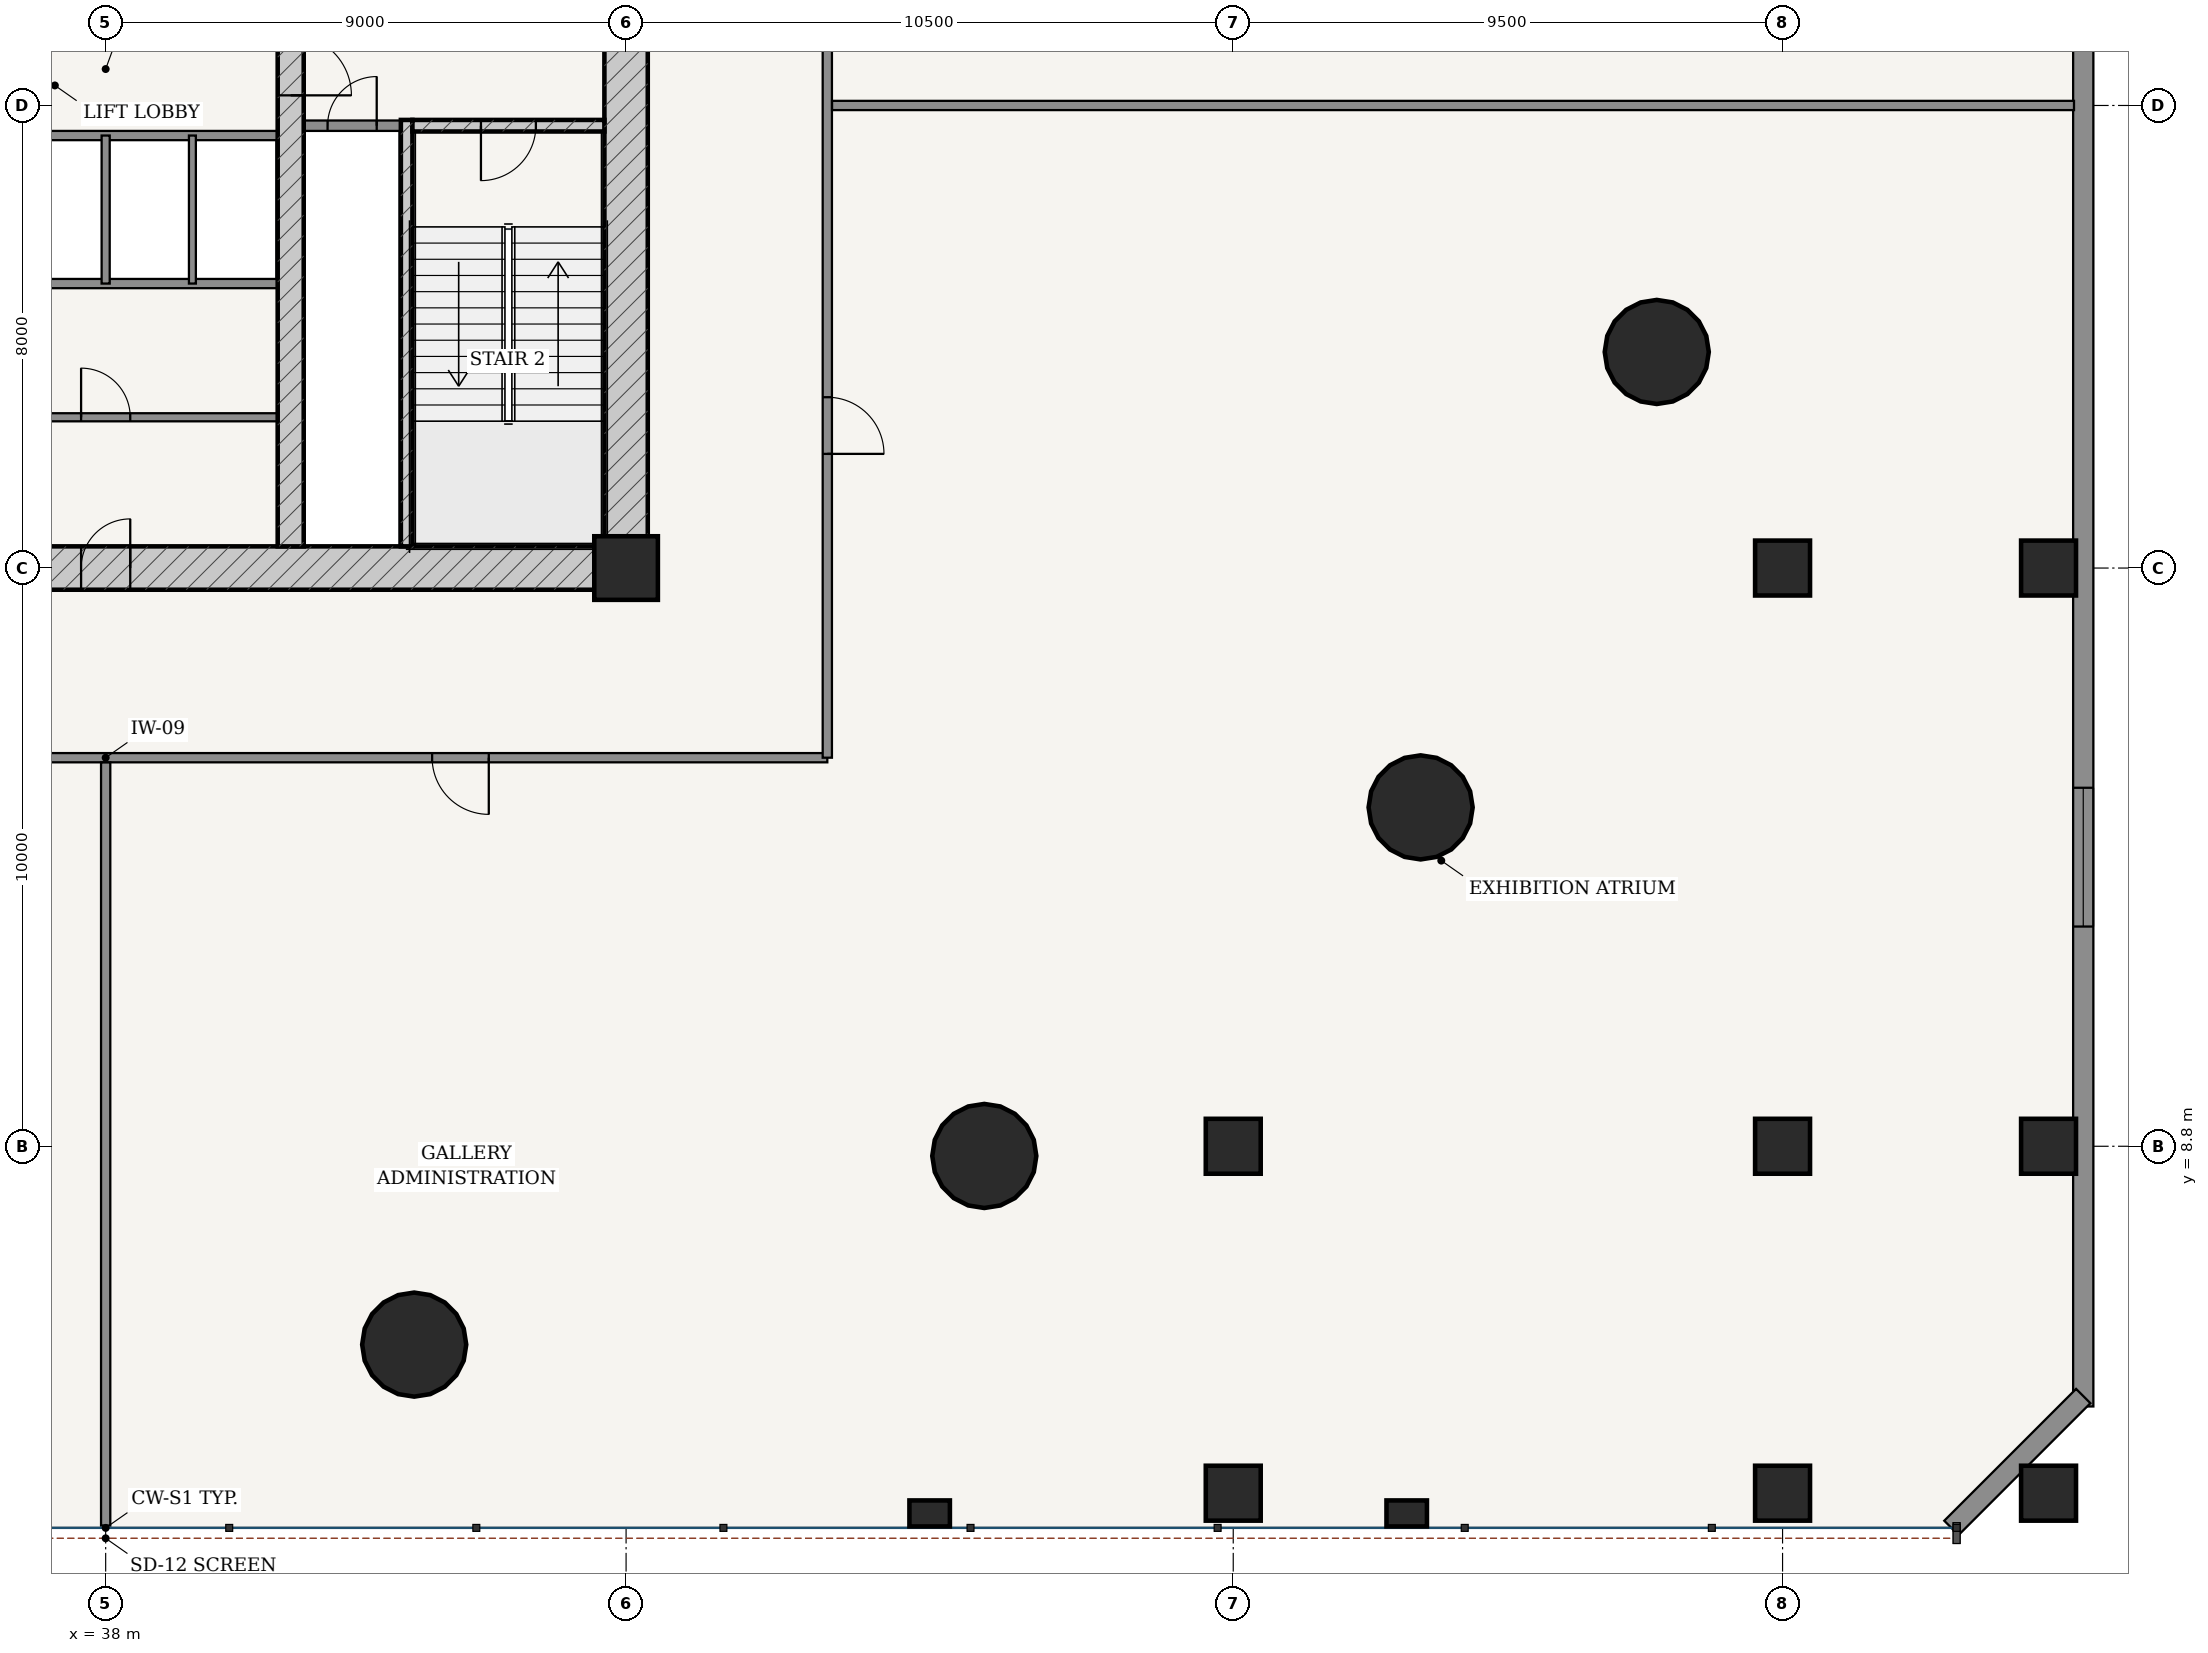
"""IFC4 building model, lengths in metres.
Left out: names, types, materials, properties, quantities, classifications, styles, units other than length and angle.
Written with IfcOpenShell. Run it as: python <this file> out.ifc"""

import sys

from ifc_helpers import new_model, si_unit, direction, frame, frame_2d, origin, origin_2d, place, context, subcontext, project, spatial, rectangle, hollow_circle, extrude, source, transform, mapped, element, fill, save


model = new_model("IFC4")
c1 = context("Model", 3, precision=1e-05, world=origin(), true_north=direction((-0.2419218956, 0.970295726276)))
c2 = subcontext(c1, "Body", "Model", "MODEL_VIEW")
j1 = project(units=[si_unit("LENGTHUNIT", "METRE"), si_unit("PLANEANGLEUNIT", "RADIAN")], contexts=[c1])
p1 = place(None, origin())
s1 = spatial("IfcSite", under=j1, at=p1, CompositionType="ELEMENT")
p2 = place(p1, origin())
s2 = spatial("IfcBuilding", under=s1, at=p2, CompositionType="ELEMENT")
p3 = place(p2, frame((0.0, 0.0, 5.4)))
s3 = spatial("IfcBuildingStorey", under=s2, at=p3, CompositionType="ELEMENT", Elevation=5.4)
p4 = place(p3, frame((47.0, 18.8, 0.0), z_axis=(0.0, 0.0, 1.0), x_axis=(1.0, 0.0, 0.0)))
e1 = element("IfcColumn", 1, at=p4, inside=s3, PredefinedType="COLUMN", context=c2, shape_type="SweptSolid", body=[
    extrude(rectangle(XDim=1.1, YDim=1.1, at=origin_2d()), origin(), (0.0, 0.0, 1.0), 4.5),
])
p5 = place(p3, frame((28.625, 18.8, 0.0), z_axis=(0.0, 0.0, 1.0), x_axis=(1.0, 0.0, 0.0)))
e2 = element("IfcWall", 2, at=p5, inside=s3, PredefinedType="SHEAR", context=c2, shape_type="SweptSolid", body=[
    extrude(rectangle(XDim=18.75, YDim=0.75, at=frame_2d((9.375, 0.0))), origin(), (0.0, 0.0, 1.0), 4.2),
])
p6 = place(p5, frame((8.95, 0.0, 0.0)))
e3 = element("IfcOpeningElement", 3, at=p6, cuts=e2, PredefinedType="OPENING", context=c2, shape_type="SweptSolid", body=[
    extrude(rectangle(XDim=0.85, YDim=2.1, at=frame_2d((0.425, 1.05))), frame((0.0, 0.385, 0.0), z_axis=(0.0, -1.0, 0.0), x_axis=(1.0, 0.0, 0.0)), (0.0, 0.0, 1.0), 0.77),
])
p7 = place(p3, frame((47.0, 19.175, 0.0), z_axis=(0.0, 0.0, 1.0), x_axis=(0.0, 1.0, 0.0)))
e4 = element("IfcWall", 4, at=p7, inside=s3, PredefinedType="SHEAR", context=c2, shape_type="SweptSolid", body=[
    extrude(rectangle(XDim=15.25, YDim=0.75, at=frame_2d((7.625, 0.0))), origin(), (0.0, 0.0, 1.0), 4.2),
])
p8 = place(p7, frame((9.875, 0.0, 0.0)))
e5 = element("IfcOpeningElement", 5, at=p8, cuts=e4, PredefinedType="OPENING", context=c2, shape_type="SweptSolid", body=[
    extrude(rectangle(XDim=1.5, YDim=2.2, at=frame_2d((0.75, 1.1))), frame((0.0, 0.385, 0.0), z_axis=(0.0, -1.0, 0.0), x_axis=(1.0, 0.0, 0.0)), (0.0, 0.0, 1.0), 0.77),
])
p9 = place(p3, frame((43.205, 19.175, 0.0), z_axis=(0.0, 0.0, 1.0), x_axis=(0.0, 1.0, 0.0)))
e6 = element("IfcWall", 6, at=p9, inside=s3, PredefinedType="SOLIDWALL", context=c2, shape_type="SweptSolid", body=[
    extrude(rectangle(XDim=7.375, YDim=0.2, at=frame_2d((3.688, 0.0))), origin(), (0.0, 0.0, 1.0), 4.2),
])
p10 = place(p3, frame((43.305, 26.45, 0.0), z_axis=(0.0, 0.0, 1.0), x_axis=(1.0, 0.0, 0.0)))
e7 = element("IfcWall", 7, at=p10, inside=s3, PredefinedType="SOLIDWALL", context=c2, shape_type="SweptSolid", body=[
    extrude(rectangle(XDim=3.32, YDim=0.2, at=frame_2d((1.66, 0.0))), origin(), (0.0, 0.0, 1.0), 4.2),
])
p11 = place(p10, frame((1.185, 0.0, 0.0)))
e8 = element("IfcOpeningElement", 8, at=p11, cuts=e7, PredefinedType="OPENING", context=c2, shape_type="SweptSolid", body=[
    extrude(rectangle(XDim=0.95, YDim=2.15, at=frame_2d((0.475, 1.075))), frame((0.0, 0.11, 0.0), z_axis=(0.0, -1.0, 0.0), x_axis=(1.0, 0.0, 0.0)), (0.0, 0.0, 1.0), 0.22),
])
p12 = place(p3, frame((41.2, 19.175, 0.0), z_axis=(0.0, 0.0, 1.0), x_axis=(0.0, 1.0, 0.0)))
e9 = element("IfcWall", 9, at=p12, inside=s3, PredefinedType="SHEAR", context=c2, shape_type="SweptSolid", body=[
    extrude(rectangle(XDim=15.25, YDim=0.45, at=frame_2d((7.625, 0.0))), origin(), (0.0, 0.0, 1.0), 4.2),
])
p13 = place(p12, frame((7.8, 0.0, 0.0)))
e10 = element("IfcOpeningElement", 10, at=p13, cuts=e9, PredefinedType="OPENING", context=c2, shape_type="SweptSolid", body=[
    extrude(rectangle(XDim=1.05, YDim=2.15, at=frame_2d((0.525, 1.075))), frame((0.0, 0.235, 0.0), z_axis=(0.0, -1.0, 0.0), x_axis=(1.0, 0.0, 0.0)), (0.0, 0.0, 1.0), 0.47),
])
for number, where, z_axis, x_axis in (
    (11, (43.336, 5.37, 0.0), (0.0, 0.0, 1.0), (1.0, 0.0, 0.0)),
    (12, (53.195, 8.632, 0.0), (0.0, 0.0, 1.0), (1.0, 0.0, 0.0)),
    (13, (60.741, 14.661, 0.0), (0.0, 0.0, 1.0), (1.0, 0.0, 0.0)),
    (14, (64.824, 22.537, 0.0), (0.0, 0.0, 1.0), (1.0, 0.0, 0.0)),
):
    element("IfcColumn", number, at=place(p3, frame(where, z_axis=z_axis, x_axis=x_axis)), inside=s3, PredefinedType="COLUMN", context=c2, shape_type="SweptSolid", body=[
        extrude(hollow_circle(Radius=0.9, WallThickness=0.055, at=origin_2d()), origin(), (0.0, 0.0, 1.0), 4.5),
    ])
for number, where, z_axis, x_axis in (
    (15, (57.5, 2.8, 0.0), (0.0, 0.0, 1.0), (1.0, 0.0, 0.0)),
    (16, (57.5, 8.8, 0.0), (0.0, 0.0, 1.0), (1.0, 0.0, 0.0)),
    (17, (67.0, 2.8, 0.0), (0.0, 0.0, 1.0), (1.0, 0.0, 0.0)),
    (18, (67.0, 8.8, 0.0), (0.0, 0.0, 1.0), (1.0, 0.0, 0.0)),
    (19, (67.0, 18.8, 0.0), (0.0, 0.0, 1.0), (1.0, 0.0, 0.0)),
    (20, (71.6, 2.8, 0.0), (0.0, 0.0, 1.0), (1.0, 0.0, 0.0)),
    (21, (71.6, 8.8, 0.0), (0.0, 0.0, 1.0), (1.0, 0.0, 0.0)),
    (22, (71.6, 18.8, 0.0), (0.0, 0.0, 1.0), (1.0, 0.0, 0.0)),
):
    element("IfcColumn", number, at=place(p3, frame(where, z_axis=z_axis, x_axis=x_axis)), inside=s3, PredefinedType="COLUMN", context=c2, shape_type="SweptSolid", body=[
        extrude(rectangle(XDim=0.95, YDim=0.95, at=origin_2d()), origin(), (0.0, 0.0, 1.0), 4.5),
    ])
for number, where, z_axis, x_axis in (
    (23, (52.25, 2.45, 0.0), (0.0, 0.0, 1.0), (1.0, 0.0, 0.0)),
    (24, (60.5, 2.45, 0.0), (0.0, 0.0, 1.0), (1.0, 0.0, 0.0)),
):
    element("IfcColumn", number, at=place(p3, frame(where, z_axis=z_axis, x_axis=x_axis)), inside=s3, PredefinedType="PILASTER", context=c2, shape_type="SweptSolid", body=[
        extrude(rectangle(XDim=0.7, YDim=0.45, at=origin_2d()), origin(), (0.0, 0.0, 1.0), 4.5),
    ])
p14 = place(p3, frame((72.2, 4.3, 0.0), z_axis=(0.0, 0.0, 1.0), x_axis=(0.0, 1.0, 0.0)))
e25 = element("IfcWall", 25, at=p14, inside=s3, PredefinedType="SOLIDWALL", context=c2, shape_type="SweptSolid", body=[
    extrude(rectangle(XDim=45.0, YDim=0.35, at=frame_2d((22.5, 0.0))), origin(), (0.0, 0.0, 1.0), 4.2),
])
p15 = place(p14, frame((8.3, 0.0, 0.85)))
e26 = element("IfcOpeningElement", 26, at=p15, cuts=e25, PredefinedType="OPENING", context=c2, shape_type="SweptSolid", body=[
    extrude(rectangle(XDim=2.4, YDim=2.2, at=frame_2d((1.2, 1.1))), frame((0.0, 0.185, 0.0), z_axis=(0.0, -1.0, 0.0), x_axis=(1.0, 0.0, 0.0)), (0.0, 0.0, 1.0), 0.37),
])
p16 = place(p14, frame((25.3, 0.0, 0.85)))
e27 = element("IfcOpeningElement", 27, at=p16, cuts=e25, PredefinedType="OPENING", context=c2, shape_type="SweptSolid", body=[
    extrude(rectangle(XDim=2.4, YDim=2.2, at=frame_2d((1.2, 1.1))), frame((0.0, 0.185, 0.0), z_axis=(0.0, -1.0, 0.0), x_axis=(1.0, 0.0, 0.0)), (0.0, 0.0, 1.0), 0.37),
])
p17 = place(p14, frame((34.3, 0.0, 0.85)))
e28 = element("IfcOpeningElement", 28, at=p17, cuts=e25, PredefinedType="OPENING", context=c2, shape_type="SweptSolid", body=[
    extrude(rectangle(XDim=2.4, YDim=2.2, at=frame_2d((1.2, 1.1))), frame((0.0, 0.185, 0.0), z_axis=(0.0, -1.0, 0.0), x_axis=(1.0, 0.0, 0.0)), (0.0, 0.0, 1.0), 0.37),
])
p18 = place(p3, frame((69.92, 2.2, 0.0), z_axis=(0.0, 0.0, 1.0), x_axis=(0.707106781187, 0.707106781187, 0.0)))
e29 = element("IfcWall", 29, at=p18, inside=s3, PredefinedType="SOLIDWALL", context=c2, shape_type="SweptSolid", body=[
    extrude(rectangle(XDim=3.224, YDim=0.35, at=frame_2d((1.612, 0.0))), origin(), (0.0, 0.0, 1.0), 3.235),
])
p19 = place(p3, frame((41.425, 26.45, 0.0), z_axis=(0.0, 0.0, 1.0), x_axis=(1.0, 0.0, 0.0)))
e30 = element("IfcWall", 30, at=p19, inside=s3, PredefinedType="PARTITIONING", context=c2, shape_type="SweptSolid", body=[
    extrude(rectangle(XDim=1.675, YDim=0.18, at=frame_2d((0.837, 0.0))), origin(), (0.0, 0.0, 1.0), 4.2),
])
p20 = place(p19, frame((0.413, 0.0, 0.0)))
e31 = element("IfcOpeningElement", 31, at=p20, cuts=e30, PredefinedType="OPENING", context=c2, shape_type="SweptSolid", body=[
    extrude(rectangle(XDim=0.85, YDim=2.1, at=frame_2d((0.425, 1.05))), frame((0.0, 0.1, 0.0), z_axis=(0.0, -1.0, 0.0), x_axis=(1.0, 0.0, 0.0)), (0.0, 0.0, 1.0), 0.2),
])
for number, where, z_axis, x_axis in (
    (32, (35.025, 26.28, 0.0), (0.0, 0.0, 1.0), (1.0, 0.0, 0.0)),
    (33, (35.025, 23.72, 0.0), (0.0, 0.0, 1.0), (1.0, 0.0, 0.0)),
):
    element("IfcWall", number, at=place(p3, frame(where, z_axis=z_axis, x_axis=x_axis)), inside=s3, PredefinedType="PARTITIONING", context=c2, shape_type="SweptSolid", body=[
        extrude(rectangle(XDim=5.95, YDim=0.16, at=frame_2d((2.975, 0.0))), origin(), (0.0, 0.0, 1.0), 4.2),
    ])
p21 = place(p3, frame((38.0, 23.72, 0.0), z_axis=(0.0, 0.0, 1.0), x_axis=(0.0, 1.0, 0.0)))
e34 = element("IfcWall", 34, at=p21, inside=s3, PredefinedType="PARTITIONING", context=c2, shape_type="SweptSolid", body=[
    extrude(rectangle(XDim=2.56, YDim=0.14, at=frame_2d((1.28, 0.0))), origin(), (0.0, 0.0, 1.0), 4.2),
])
p22 = place(p3, frame((39.5, 23.72, 0.0), z_axis=(0.0, 0.0, 1.0), x_axis=(0.0, 1.0, 0.0)))
e35 = element("IfcWall", 35, at=p22, inside=s3, PredefinedType="PARTITIONING", context=c2, shape_type="SweptSolid", body=[
    extrude(rectangle(XDim=2.56, YDim=0.12, at=frame_2d((1.28, 0.0))), origin(), (0.0, 0.0, 1.0), 4.2),
])
p23 = place(p3, frame((35.025, 21.407, 0.0), z_axis=(0.0, 0.0, 1.0), x_axis=(1.0, 0.0, 0.0)))
e36 = element("IfcWall", 36, at=p23, inside=s3, PredefinedType="PARTITIONING", context=c2, shape_type="SweptSolid", body=[
    extrude(rectangle(XDim=5.95, YDim=0.14, at=frame_2d((2.975, 0.0))), origin(), (0.0, 0.0, 1.0), 4.2),
])
p24 = place(p23, frame((2.55, 0.0, 0.0)))
e37 = element("IfcOpeningElement", 37, at=p24, cuts=e36, PredefinedType="OPENING", context=c2, shape_type="SweptSolid", body=[
    extrude(rectangle(XDim=0.85, YDim=2.1, at=frame_2d((0.425, 1.05))), frame((0.0, 0.08, 0.0), z_axis=(0.0, -1.0, 0.0), x_axis=(1.0, 0.0, 0.0)), (0.0, 0.0, 1.0), 0.16),
])
p25 = place(p3, frame((25.52, 15.52, 0.0), z_axis=(0.0, 0.0, 1.0), x_axis=(1.0, 0.0, 0.0)))
e38 = element("IfcWall", 38, at=p25, inside=s3, PredefinedType="PARTITIONING", context=c2, shape_type="SweptSolid", body=[
    extrude(rectangle(XDim=24.96, YDim=0.16, at=frame_2d((12.48, 0.0))), origin(), (0.0, 0.0, 1.0), 3.55),
])
p26 = place(p25, frame((5.854, 0.0, 0.0)))
e39 = element("IfcOpeningElement", 39, at=p26, cuts=e38, PredefinedType="OPENING", context=c2, shape_type="SweptSolid", body=[
    extrude(rectangle(XDim=0.98, YDim=2.2, at=frame_2d((0.49, 1.1))), frame((0.0, 0.09, 0.0), z_axis=(0.0, -1.0, 0.0), x_axis=(1.0, 0.0, 0.0)), (0.0, 0.0, 1.0), 0.18),
])
p27 = place(p25, frame((18.125, 0.0, 0.0)))
e40 = element("IfcOpeningElement", 40, at=p27, cuts=e38, PredefinedType="OPENING", context=c2, shape_type="SweptSolid", body=[
    extrude(rectangle(XDim=0.98, YDim=2.2, at=frame_2d((0.49, 1.1))), frame((0.0, 0.09, 0.0), z_axis=(0.0, -1.0, 0.0), x_axis=(1.0, 0.0, 0.0)), (0.0, 0.0, 1.0), 0.18),
])
p28 = place(p3, frame((50.48, 15.52, 0.0), z_axis=(0.0, 0.0, 1.0), x_axis=(0.0, 1.0, 0.0)))
e41 = element("IfcWall", 41, at=p28, inside=s3, PredefinedType="PARTITIONING", context=c2, shape_type="SweptSolid", body=[
    extrude(rectangle(XDim=21.56, YDim=0.16, at=frame_2d((10.78, 0.0))), origin(), (0.0, 0.0, 1.0), 3.55),
])
p29 = place(p28, frame((5.254, 0.0, 0.0)))
e42 = element("IfcOpeningElement", 42, at=p29, cuts=e41, PredefinedType="OPENING", context=c2, shape_type="SweptSolid", body=[
    extrude(rectangle(XDim=0.98, YDim=2.2, at=frame_2d((0.49, 1.1))), frame((0.0, 0.09, 0.0), z_axis=(0.0, -1.0, 0.0), x_axis=(1.0, 0.0, 0.0)), (0.0, 0.0, 1.0), 0.18),
])
p30 = place(p3, frame((50.562, 26.8, 0.0), z_axis=(0.0, 0.0, 1.0), x_axis=(1.0, 0.0, 0.0)))
e43 = element("IfcWall", 43, at=p30, inside=s3, PredefinedType="PARTITIONING", context=c2, shape_type="SweptSolid", body=[
    extrude(rectangle(XDim=21.478, YDim=0.16, at=frame_2d((10.739, 0.0))), origin(), (0.0, 0.0, 1.0), 3.642),
])
p31 = place(p3, frame((38.0, 2.24, 0.0), z_axis=(0.0, 0.0, 1.0), x_axis=(0.0, 1.0, 0.0)))
e44 = element("IfcWall", 44, at=p31, inside=s3, PredefinedType="PARTITIONING", context=c2, shape_type="SweptSolid", body=[
    extrude(rectangle(XDim=13.198, YDim=0.16, at=frame_2d((6.599, 0.0))), origin(), (0.0, 0.0, 1.0), 3.642),
])
m1 = source(origin(), c2, "Body", "SweptSolid", [
    extrude(rectangle(XDim=2.4, YDim=2.2, at=frame_2d((1.2, 1.1))), frame((0.0, 0.03, 0.0), z_axis=(0.0, -1.0, 0.0), x_axis=(1.0, 0.0, 0.0)), (0.0, 0.0, 1.0), 0.06),
])
p32 = place(p15, origin())
e45 = element("IfcWindow", 45, at=p32, inside=s3, PartitioningType="SINGLE_PANEL", PredefinedType="WINDOW", context=c2, shape_type="MappedRepresentation", body=[
    mapped(m1, transform((0.0, 0.0, 0.0), scale=1.0)),
])
fill(e26, e45)
m2 = source(origin(), c2, "Body", "SweptSolid", [
    extrude(rectangle(XDim=1.05, YDim=2.15, at=frame_2d((0.525, 1.075))), frame((0.0, 0.025, 0.0), z_axis=(0.0, -1.0, 0.0), x_axis=(1.0, 0.0, 0.0)), (0.0, 0.0, 1.0), 0.05),
])
p33 = place(p13, frame((1.05, 0.0, 0.0), z_axis=(0.0, 0.0, 1.0), x_axis=(-1.0, 0.0, 0.0)))
e46 = element("IfcDoor", 46, at=p33, inside=s3, OperationType="SINGLE_SWING_RIGHT", PredefinedType="DOOR", context=c2, shape_type="MappedRepresentation", body=[
    mapped(m2, transform((0.0, 0.0, 0.0), scale=1.0)),
])
fill(e10, e46)
m3 = source(origin(), c2, "Body", "SweptSolid", [
    extrude(rectangle(XDim=0.95, YDim=2.15, at=frame_2d((0.475, 1.075))), frame((0.0, 0.025, 0.0), z_axis=(0.0, -1.0, 0.0), x_axis=(1.0, 0.0, 0.0)), (0.0, 0.0, 1.0), 0.05),
])
p34 = place(p11, frame((0.95, 0.0, 0.0), z_axis=(0.0, 0.0, 1.0), x_axis=(-1.0, 0.0, 0.0)))
e47 = element("IfcDoor", 47, at=p34, inside=s3, OperationType="SINGLE_SWING_RIGHT", PredefinedType="DOOR", context=c2, shape_type="MappedRepresentation", body=[
    mapped(m3, transform((0.0, 0.0, 0.0), scale=1.0)),
])
fill(e8, e47)
m4 = source(origin(), c2, "Body", "SweptSolid", [
    extrude(rectangle(XDim=0.85, YDim=2.1, at=frame_2d((0.425, 1.05))), frame((0.0, 0.025, 0.0), z_axis=(0.0, -1.0, 0.0), x_axis=(1.0, 0.0, 0.0)), (0.0, 0.0, 1.0), 0.05),
])
p35 = place(p20, origin())
e48 = element("IfcDoor", 48, at=p35, inside=s3, OperationType="SINGLE_SWING_RIGHT", PredefinedType="DOOR", context=c2, shape_type="MappedRepresentation", body=[
    mapped(m4, transform((0.0, 0.0, 0.0), scale=1.0)),
])
fill(e31, e48)
p36 = place(p6, origin())
e49 = element("IfcDoor", 49, at=p36, inside=s3, OperationType="SINGLE_SWING_RIGHT", PredefinedType="DOOR", context=c2, shape_type="MappedRepresentation", body=[
    mapped(m4, transform((0.0, 0.0, 0.0), scale=1.0)),
])
fill(e3, e49)
p37 = place(p24, origin())
e50 = element("IfcDoor", 50, at=p37, inside=s3, OperationType="SINGLE_SWING_LEFT", PredefinedType="DOOR", context=c2, shape_type="MappedRepresentation", body=[
    mapped(m4, transform((0.0, 0.0, 0.0), scale=1.0)),
])
fill(e37, e50)
m5 = source(origin(), c2, "Body", "SweptSolid", [
    extrude(rectangle(XDim=0.98, YDim=2.2, at=frame_2d((0.49, 1.1))), frame((0.0, 0.025, 0.0), z_axis=(0.0, -1.0, 0.0), x_axis=(1.0, 0.0, 0.0)), (0.0, 0.0, 1.0), 0.05),
])
p38 = place(p29, frame((0.98, 0.0, 0.0), z_axis=(0.0, 0.0, 1.0), x_axis=(-1.0, 0.0, 0.0)))
e51 = element("IfcDoor", 51, at=p38, inside=s3, OperationType="SINGLE_SWING_RIGHT", PredefinedType="DOOR", context=c2, shape_type="MappedRepresentation", body=[
    mapped(m5, transform((0.0, 0.0, 0.0), scale=1.0)),
])
fill(e42, e51)
p39 = place(p27, frame((0.98, 0.0, 0.0), z_axis=(0.0, 0.0, 1.0), x_axis=(-1.0, 0.0, 0.0)))
e52 = element("IfcDoor", 52, at=p39, inside=s3, OperationType="SINGLE_SWING_LEFT", PredefinedType="DOOR", context=c2, shape_type="MappedRepresentation", body=[
    mapped(m5, transform((0.0, 0.0, 0.0), scale=1.0)),
])
fill(e40, e52)
save(model, sys.argv[1])
